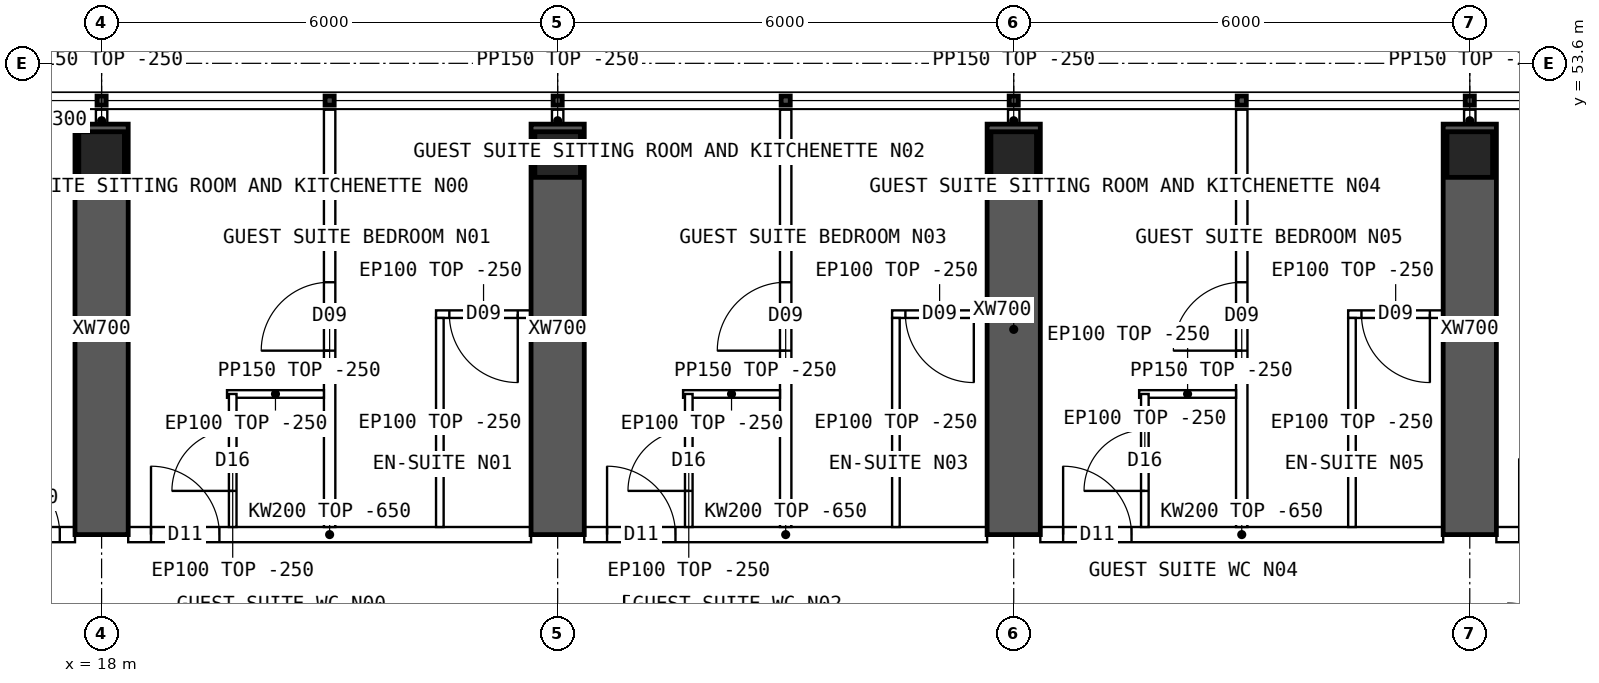
"""IFC4 building model, lengths in metres.
Left out: names, types, materials, properties, quantities, classifications, styles, units other than length and angle.
Written with IfcOpenShell. Run it as: python <this file> out.ifc"""

import sys

from ifc_helpers import new_model, si_unit, direction, frame, frame_2d, origin, origin_2d, place, context, subcontext, project, spatial, polyline, rectangle, hollow_rectangle, outline, extrude, element, fill, save


model = new_model("IFC4")
c1 = context("Model", 3, precision=1e-05, world=origin(), true_north=direction((0.0, 1.0)))
c2 = subcontext(c1, "Body", "Model", "MODEL_VIEW")
j1 = project(units=[si_unit("LENGTHUNIT", "METRE"), si_unit("PLANEANGLEUNIT", "RADIAN")], contexts=[c1])
p1 = place(None, origin())
s1 = spatial("IfcSite", under=j1, at=p1, CompositionType="ELEMENT")
p2 = place(p1, origin())
s2 = spatial("IfcBuilding", under=s1, at=p2, CompositionType="ELEMENT")
p3 = place(p2, frame((0.0, 0.0, 239.05)))
s3 = spatial("IfcBuildingStorey", under=s2, at=p3, CompositionType="ELEMENT", Elevation=239.05)
for number, where, z_axis, x_axis in (
    (1, (18.0, 52.4, 0.0), (0.0, 0.0, 1.0), (1.0, 0.0, 0.0)),
    (2, (24.0, 52.4, 0.0), (0.0, 0.0, 1.0), (1.0, 0.0, 0.0)),
    (3, (30.0, 52.4, 0.0), (0.0, 0.0, 1.0), (1.0, 0.0, 0.0)),
    (4, (36.0, 52.4, 0.0), (0.0, 0.0, 1.0), (1.0, 0.0, 0.0)),
):
    element("IfcColumn", number, at=place(p3, frame(where, z_axis=z_axis, x_axis=x_axis)), inside=s3, PredefinedType="COLUMN", context=c2, shape_type="SweptSolid", body=[
        extrude(hollow_rectangle(XDim=0.6, YDim=0.6, WallThickness=0.06, at=origin_2d()), origin(), (0.0, 0.0, 1.0), 3.75),
    ])
for number, where, z_axis, x_axis in (
    (5, (18.0, 47.4, 0.0), (0.0, 0.0, 1.0), (0.0, 1.0, 0.0)),
    (6, (24.0, 47.4, 0.0), (0.0, 0.0, 1.0), (0.0, 1.0, 0.0)),
    (7, (30.0, 47.4, 0.0), (0.0, 0.0, 1.0), (0.0, 1.0, 0.0)),
    (8, (36.0, 47.4, 0.0), (0.0, 0.0, 1.0), (0.0, 1.0, 0.0)),
):
    element("IfcWall", number, at=place(p3, frame(where, z_axis=z_axis, x_axis=x_axis)), inside=s3, PredefinedType="SHEAR", context=c2, shape_type="SweptSolid", body=[
        extrude(rectangle(XDim=5.4, YDim=0.7, at=frame_2d((2.7, 0.0))), origin(), (0.0, 0.0, 1.0), 3.75),
    ])
p4 = place(p3, frame((17.2, 52.85, 0.0), z_axis=(0.0, 0.0, 1.0), x_axis=(1.0, 0.0, 0.0)))
e9 = element("IfcWall", 9, at=p4, inside=s3, PredefinedType="SOLIDWALL", context=c2, shape_type="SweptSolid", body=[
    extrude(rectangle(XDim=0.45, YDim=0.3, at=frame_2d((0.225, 0.0))), origin(), (0.0, 0.0, 1.0), 3.5),
])
p5 = place(p3, frame((15.6, 47.4, 0.0), z_axis=(0.0, 0.0, 1.0), x_axis=(1.0, 0.0, 0.0)))
e10 = element("IfcWall", 10, at=p5, inside=s3, PredefinedType="SOLIDWALL", context=c2, shape_type="SweptSolid", body=[
    extrude(rectangle(XDim=2.05, YDim=0.2, at=frame_2d((1.025, 0.0))), origin(), (0.0, 0.0, 1.0), 3.5),
])
p6 = place(p5, frame((0.95, 0.0, 0.0)))
e11 = element("IfcOpeningElement", 11, at=p6, cuts=e10, PredefinedType="OPENING", context=c2, shape_type="SweptSolid", body=[
    extrude(rectangle(XDim=0.9, YDim=2.1, at=frame_2d((0.45, 1.05))), frame((0.0, 0.11, 0.0), z_axis=(0.0, -1.0, 0.0), x_axis=(1.0, 0.0, 0.0)), (0.0, 0.0, 1.0), 0.22),
])
p7 = place(p3, frame((18.35, 47.4, 0.0), z_axis=(0.0, 0.0, 1.0), x_axis=(1.0, 0.0, 0.0)))
e12 = element("IfcWall", 12, at=p7, inside=s3, PredefinedType="SOLIDWALL", context=c2, shape_type="SweptSolid", body=[
    extrude(outline(polyline([(0.0, 0.0), (5.3, 0.0), (5.3, 3.1), (0.0, 3.1), (0.0, 0.0)])), frame((0.0, 0.1, 0.0), z_axis=(0.0, -1.0, 0.0), x_axis=(1.0, 0.0, 0.0)), (0.0, 0.0, 1.0), 0.2),
])
p8 = place(p7, frame((0.3, 0.0, 0.0)))
e13 = element("IfcOpeningElement", 13, at=p8, cuts=e12, PredefinedType="OPENING", context=c2, shape_type="SweptSolid", body=[
    extrude(rectangle(XDim=0.9, YDim=2.1, at=frame_2d((0.45, 1.05))), frame((0.0, 0.11, 0.0), z_axis=(0.0, -1.0, 0.0), x_axis=(1.0, 0.0, 0.0)), (0.0, 0.0, 1.0), 0.22),
])
p9 = place(p3, frame((24.35, 47.4, 0.0), z_axis=(0.0, 0.0, 1.0), x_axis=(1.0, 0.0, 0.0)))
e14 = element("IfcWall", 14, at=p9, inside=s3, PredefinedType="SOLIDWALL", context=c2, shape_type="SweptSolid", body=[
    extrude(outline(polyline([(0.0, 0.0), (5.3, 0.0), (5.3, 3.1), (0.0, 3.1), (0.0, 0.0)])), frame((0.0, 0.1, 0.0), z_axis=(0.0, -1.0, 0.0), x_axis=(1.0, 0.0, 0.0)), (0.0, 0.0, 1.0), 0.2),
])
p10 = place(p9, frame((0.3, 0.0, 0.0)))
e15 = element("IfcOpeningElement", 15, at=p10, cuts=e14, PredefinedType="OPENING", context=c2, shape_type="SweptSolid", body=[
    extrude(rectangle(XDim=0.9, YDim=2.1, at=frame_2d((0.45, 1.05))), frame((0.0, 0.11, 0.0), z_axis=(0.0, -1.0, 0.0), x_axis=(1.0, 0.0, 0.0)), (0.0, 0.0, 1.0), 0.22),
])
p11 = place(p3, frame((30.35, 47.4, 0.0), z_axis=(0.0, 0.0, 1.0), x_axis=(1.0, 0.0, 0.0)))
e16 = element("IfcWall", 16, at=p11, inside=s3, PredefinedType="SOLIDWALL", context=c2, shape_type="SweptSolid", body=[
    extrude(outline(polyline([(0.0, 0.0), (5.3, 0.0), (5.3, 3.1), (0.0, 3.1), (0.0, 0.0)])), frame((0.0, 0.1, 0.0), z_axis=(0.0, -1.0, 0.0), x_axis=(1.0, 0.0, 0.0)), (0.0, 0.0, 1.0), 0.2),
])
p12 = place(p11, frame((0.3, 0.0, 0.0)))
e17 = element("IfcOpeningElement", 17, at=p12, cuts=e16, PredefinedType="OPENING", context=c2, shape_type="SweptSolid", body=[
    extrude(rectangle(XDim=0.9, YDim=2.1, at=frame_2d((0.45, 1.05))), frame((0.0, 0.11, 0.0), z_axis=(0.0, -1.0, 0.0), x_axis=(1.0, 0.0, 0.0)), (0.0, 0.0, 1.0), 0.22),
])
p13 = place(p3, frame((36.35, 47.4, 0.0), z_axis=(0.0, 0.0, 1.0), x_axis=(1.0, 0.0, 0.0)))
e18 = element("IfcWall", 18, at=p13, inside=s3, PredefinedType="SOLIDWALL", context=c2, shape_type="SweptSolid", body=[
    extrude(outline(polyline([(0.0, 0.0), (5.3, 0.0), (5.3, 3.1), (0.0, 3.1), (0.0, 0.0)])), frame((0.0, 0.1, 0.0), z_axis=(0.0, -1.0, 0.0), x_axis=(1.0, 0.0, 0.0)), (0.0, 0.0, 1.0), 0.2),
])
p14 = place(p13, frame((0.3, 0.0, 0.0)))
e19 = element("IfcOpeningElement", 19, at=p14, cuts=e18, PredefinedType="OPENING", context=c2, shape_type="SweptSolid", body=[
    extrude(rectangle(XDim=1.0, YDim=2.1, at=frame_2d((0.5, 1.05))), frame((0.0, 0.11, 0.0), z_axis=(0.0, -1.0, 0.0), x_axis=(1.0, 0.0, 0.0)), (0.0, 0.0, 1.0), 0.22),
])
p15 = place(p3, frame((21.0, 52.99, 0.0), z_axis=(0.0, 0.0, 1.0), x_axis=(0.0, -1.0, 0.0)))
e20 = element("IfcWall", 20, at=p15, inside=s3, PredefinedType="PARTITIONING", context=c2, shape_type="SweptSolid", body=[
    extrude(outline(polyline([(0.0, 0.0), (5.49, 0.0), (5.49, 3.1), (5.442, 3.1), (5.44, 3.5), (0.792, 3.5), (0.79, 3.1), (0.392, 3.1), (0.39, 3.5), (0.0, 3.5), (0.0, 0.0)])), frame((0.0, 0.075, 0.0), z_axis=(0.0, -1.0, 0.0), x_axis=(1.0, 0.0, 0.0)), (0.0, 0.0, 1.0), 0.15),
])
p16 = place(p15, frame((2.27, 0.0, 0.0)))
e21 = element("IfcOpeningElement", 21, at=p16, cuts=e20, PredefinedType="OPENING", context=c2, shape_type="SweptSolid", body=[
    extrude(rectangle(XDim=0.9, YDim=2.1, at=frame_2d((0.45, 1.05))), frame((0.0, 0.085, 0.0), z_axis=(0.0, -1.0, 0.0), x_axis=(1.0, 0.0, 0.0)), (0.0, 0.0, 1.0), 0.17),
])
p17 = place(p3, frame((22.4, 50.3, 0.0), z_axis=(0.0, 0.0, 1.0), x_axis=(1.0, 0.0, 0.0)))
e22 = element("IfcWall", 22, at=p17, inside=s3, PredefinedType="PARTITIONING", context=c2, shape_type="SweptSolid", body=[
    extrude(rectangle(XDim=1.25, YDim=0.1, at=frame_2d((0.625, 0.0))), origin(), (0.0, 0.0, 1.0), 3.5),
])
p18 = place(p17, frame((0.175, 0.0, 0.0)))
e23 = element("IfcOpeningElement", 23, at=p18, cuts=e22, PredefinedType="OPENING", context=c2, shape_type="SweptSolid", body=[
    extrude(rectangle(XDim=0.9, YDim=2.1, at=frame_2d((0.45, 1.05))), frame((0.0, 0.06, 0.0), z_axis=(0.0, -1.0, 0.0), x_axis=(1.0, 0.0, 0.0)), (0.0, 0.0, 1.0), 0.12),
])
p19 = place(p3, frame((22.45, 50.25, 0.0), z_axis=(0.0, 0.0, 1.0), x_axis=(0.0, -1.0, 0.0)))
e24 = element("IfcWall", 24, at=p19, inside=s3, PredefinedType="PARTITIONING", context=c2, shape_type="SweptSolid", body=[
    extrude(outline(polyline([(0.0, 0.0), (2.75, 0.0), (2.75, 3.1), (2.702, 3.1), (2.7, 3.5), (0.0, 3.5), (0.0, 0.0)])), frame((0.0, 0.05, 0.0), z_axis=(0.0, -1.0, 0.0), x_axis=(1.0, 0.0, 0.0)), (0.0, 0.0, 1.0), 0.1),
])
p20 = place(p3, frame((19.65, 49.25, 0.0), z_axis=(0.0, 0.0, 1.0), x_axis=(1.0, 0.0, 0.0)))
e25 = element("IfcWall", 25, at=p20, inside=s3, PredefinedType="PARTITIONING", context=c2, shape_type="SweptSolid", body=[
    extrude(rectangle(XDim=1.275, YDim=0.1, at=frame_2d((0.638, 0.0))), origin(), (0.0, 0.0, 1.0), 3.5),
])
p21 = place(p3, frame((19.725, 49.25, 0.0), z_axis=(0.0, 0.0, 1.0), x_axis=(0.0, -1.0, 0.0)))
e26 = element("IfcWall", 26, at=p21, inside=s3, PredefinedType="PARTITIONING", context=c2, shape_type="SweptSolid", body=[
    extrude(outline(polyline([(0.0, 0.0), (1.75, 0.0), (1.75, 3.1), (1.702, 3.1), (1.7, 3.5), (0.0, 3.5), (0.0, 0.0)])), frame((0.0, 0.05, 0.0), z_axis=(0.0, -1.0, 0.0), x_axis=(1.0, 0.0, 0.0)), (0.0, 0.0, 1.0), 0.1),
])
p22 = place(p21, frame((0.475, 0.0, 0.0)))
e27 = element("IfcOpeningElement", 27, at=p22, cuts=e26, PredefinedType="OPENING", context=c2, shape_type="SweptSolid", body=[
    extrude(rectangle(XDim=0.8, YDim=2.1, at=frame_2d((0.4, 1.05))), frame((0.0, 0.06, 0.0), z_axis=(0.0, -1.0, 0.0), x_axis=(1.0, 0.0, 0.0)), (0.0, 0.0, 1.0), 0.12),
])
p23 = place(p3, frame((27.0, 52.99, 0.0), z_axis=(0.0, 0.0, 1.0), x_axis=(0.0, -1.0, 0.0)))
e28 = element("IfcWall", 28, at=p23, inside=s3, PredefinedType="PARTITIONING", context=c2, shape_type="SweptSolid", body=[
    extrude(outline(polyline([(0.0, 0.0), (5.49, 0.0), (5.49, 3.1), (5.442, 3.1), (5.44, 3.5), (0.792, 3.5), (0.79, 3.1), (0.392, 3.1), (0.39, 3.5), (0.0, 3.5), (0.0, 0.0)])), frame((0.0, 0.075, 0.0), z_axis=(0.0, -1.0, 0.0), x_axis=(1.0, 0.0, 0.0)), (0.0, 0.0, 1.0), 0.15),
])
p24 = place(p23, frame((2.27, 0.0, 0.0)))
e29 = element("IfcOpeningElement", 29, at=p24, cuts=e28, PredefinedType="OPENING", context=c2, shape_type="SweptSolid", body=[
    extrude(rectangle(XDim=0.9, YDim=2.1, at=frame_2d((0.45, 1.05))), frame((0.0, 0.085, 0.0), z_axis=(0.0, -1.0, 0.0), x_axis=(1.0, 0.0, 0.0)), (0.0, 0.0, 1.0), 0.17),
])
p25 = place(p3, frame((28.4, 50.3, 0.0), z_axis=(0.0, 0.0, 1.0), x_axis=(1.0, 0.0, 0.0)))
e30 = element("IfcWall", 30, at=p25, inside=s3, PredefinedType="PARTITIONING", context=c2, shape_type="SweptSolid", body=[
    extrude(rectangle(XDim=1.25, YDim=0.1, at=frame_2d((0.625, 0.0))), origin(), (0.0, 0.0, 1.0), 3.5),
])
p26 = place(p25, frame((0.175, 0.0, 0.0)))
e31 = element("IfcOpeningElement", 31, at=p26, cuts=e30, PredefinedType="OPENING", context=c2, shape_type="SweptSolid", body=[
    extrude(rectangle(XDim=0.9, YDim=2.1, at=frame_2d((0.45, 1.05))), frame((0.0, 0.06, 0.0), z_axis=(0.0, -1.0, 0.0), x_axis=(1.0, 0.0, 0.0)), (0.0, 0.0, 1.0), 0.12),
])
p27 = place(p3, frame((28.45, 50.25, 0.0), z_axis=(0.0, 0.0, 1.0), x_axis=(0.0, -1.0, 0.0)))
e32 = element("IfcWall", 32, at=p27, inside=s3, PredefinedType="PARTITIONING", context=c2, shape_type="SweptSolid", body=[
    extrude(outline(polyline([(0.0, 0.0), (2.75, 0.0), (2.75, 3.1), (2.702, 3.1), (2.7, 3.5), (0.0, 3.5), (0.0, 0.0)])), frame((0.0, 0.05, 0.0), z_axis=(0.0, -1.0, 0.0), x_axis=(1.0, 0.0, 0.0)), (0.0, 0.0, 1.0), 0.1),
])
p28 = place(p3, frame((25.65, 49.25, 0.0), z_axis=(0.0, 0.0, 1.0), x_axis=(1.0, 0.0, 0.0)))
e33 = element("IfcWall", 33, at=p28, inside=s3, PredefinedType="PARTITIONING", context=c2, shape_type="SweptSolid", body=[
    extrude(rectangle(XDim=1.275, YDim=0.1, at=frame_2d((0.638, 0.0))), origin(), (0.0, 0.0, 1.0), 3.5),
])
p29 = place(p3, frame((25.725, 49.25, 0.0), z_axis=(0.0, 0.0, 1.0), x_axis=(0.0, -1.0, 0.0)))
e34 = element("IfcWall", 34, at=p29, inside=s3, PredefinedType="PARTITIONING", context=c2, shape_type="SweptSolid", body=[
    extrude(outline(polyline([(0.0, 0.0), (1.75, 0.0), (1.75, 3.1), (1.702, 3.1), (1.7, 3.5), (0.0, 3.5), (0.0, 0.0)])), frame((0.0, 0.05, 0.0), z_axis=(0.0, -1.0, 0.0), x_axis=(1.0, 0.0, 0.0)), (0.0, 0.0, 1.0), 0.1),
])
p30 = place(p29, frame((0.475, 0.0, 0.0)))
e35 = element("IfcOpeningElement", 35, at=p30, cuts=e34, PredefinedType="OPENING", context=c2, shape_type="SweptSolid", body=[
    extrude(rectangle(XDim=0.8, YDim=2.1, at=frame_2d((0.4, 1.05))), frame((0.0, 0.06, 0.0), z_axis=(0.0, -1.0, 0.0), x_axis=(1.0, 0.0, 0.0)), (0.0, 0.0, 1.0), 0.12),
])
p31 = place(p3, frame((33.0, 52.99, 0.0), z_axis=(0.0, 0.0, 1.0), x_axis=(0.0, -1.0, 0.0)))
e36 = element("IfcWall", 36, at=p31, inside=s3, PredefinedType="PARTITIONING", context=c2, shape_type="SweptSolid", body=[
    extrude(outline(polyline([(0.0, 0.0), (5.49, 0.0), (5.49, 3.1), (5.442, 3.1), (5.44, 3.5), (0.792, 3.5), (0.79, 3.1), (0.392, 3.1), (0.39, 3.5), (0.0, 3.5), (0.0, 0.0)])), frame((0.0, 0.075, 0.0), z_axis=(0.0, -1.0, 0.0), x_axis=(1.0, 0.0, 0.0)), (0.0, 0.0, 1.0), 0.15),
])
p32 = place(p31, frame((2.27, 0.0, 0.0)))
e37 = element("IfcOpeningElement", 37, at=p32, cuts=e36, PredefinedType="OPENING", context=c2, shape_type="SweptSolid", body=[
    extrude(rectangle(XDim=0.9, YDim=2.1, at=frame_2d((0.45, 1.05))), frame((0.0, 0.085, 0.0), z_axis=(0.0, -1.0, 0.0), x_axis=(1.0, 0.0, 0.0)), (0.0, 0.0, 1.0), 0.17),
])
p33 = place(p3, frame((34.4, 50.3, 0.0), z_axis=(0.0, 0.0, 1.0), x_axis=(1.0, 0.0, 0.0)))
e38 = element("IfcWall", 38, at=p33, inside=s3, PredefinedType="PARTITIONING", context=c2, shape_type="SweptSolid", body=[
    extrude(rectangle(XDim=1.25, YDim=0.1, at=frame_2d((0.625, 0.0))), origin(), (0.0, 0.0, 1.0), 3.5),
])
p34 = place(p33, frame((0.175, 0.0, 0.0)))
e39 = element("IfcOpeningElement", 39, at=p34, cuts=e38, PredefinedType="OPENING", context=c2, shape_type="SweptSolid", body=[
    extrude(rectangle(XDim=0.9, YDim=2.1, at=frame_2d((0.45, 1.05))), frame((0.0, 0.06, 0.0), z_axis=(0.0, -1.0, 0.0), x_axis=(1.0, 0.0, 0.0)), (0.0, 0.0, 1.0), 0.12),
])
p35 = place(p3, frame((34.45, 50.25, 0.0), z_axis=(0.0, 0.0, 1.0), x_axis=(0.0, -1.0, 0.0)))
e40 = element("IfcWall", 40, at=p35, inside=s3, PredefinedType="PARTITIONING", context=c2, shape_type="SweptSolid", body=[
    extrude(outline(polyline([(0.0, 0.0), (2.75, 0.0), (2.75, 3.1), (2.702, 3.1), (2.7, 3.5), (0.0, 3.5), (0.0, 0.0)])), frame((0.0, 0.05, 0.0), z_axis=(0.0, -1.0, 0.0), x_axis=(1.0, 0.0, 0.0)), (0.0, 0.0, 1.0), 0.1),
])
p36 = place(p3, frame((31.65, 49.25, 0.0), z_axis=(0.0, 0.0, 1.0), x_axis=(1.0, 0.0, 0.0)))
e41 = element("IfcWall", 41, at=p36, inside=s3, PredefinedType="PARTITIONING", context=c2, shape_type="SweptSolid", body=[
    extrude(rectangle(XDim=1.275, YDim=0.1, at=frame_2d((0.638, 0.0))), origin(), (0.0, 0.0, 1.0), 3.5),
])
p37 = place(p3, frame((31.725, 49.25, 0.0), z_axis=(0.0, 0.0, 1.0), x_axis=(0.0, -1.0, 0.0)))
e42 = element("IfcWall", 42, at=p37, inside=s3, PredefinedType="PARTITIONING", context=c2, shape_type="SweptSolid", body=[
    extrude(outline(polyline([(0.0, 0.0), (1.75, 0.0), (1.75, 3.1), (1.702, 3.1), (1.7, 3.5), (0.0, 3.5), (0.0, 0.0)])), frame((0.0, 0.05, 0.0), z_axis=(0.0, -1.0, 0.0), x_axis=(1.0, 0.0, 0.0)), (0.0, 0.0, 1.0), 0.1),
])
p38 = place(p37, frame((0.475, 0.0, 0.0)))
e43 = element("IfcOpeningElement", 43, at=p38, cuts=e42, PredefinedType="OPENING", context=c2, shape_type="SweptSolid", body=[
    extrude(rectangle(XDim=0.8, YDim=2.1, at=frame_2d((0.4, 1.05))), frame((0.0, 0.06, 0.0), z_axis=(0.0, -1.0, 0.0), x_axis=(1.0, 0.0, 0.0)), (0.0, 0.0, 1.0), 0.12),
])
for number, where, z_axis, x_axis in (
    (44, (18.0, 52.7, 0.0), (0.0, 0.0, 1.0), (0.0, 1.0, 0.0)),
    (45, (24.0, 52.7, 0.0), (0.0, 0.0, 1.0), (0.0, 1.0, 0.0)),
    (46, (30.0, 52.7, 0.0), (0.0, 0.0, 1.0), (0.0, 1.0, 0.0)),
    (47, (36.0, 52.7, 0.0), (0.0, 0.0, 1.0), (0.0, 1.0, 0.0)),
):
    element("IfcWall", number, at=place(p3, frame(where, z_axis=z_axis, x_axis=x_axis)), inside=s3, PredefinedType="PARTITIONING", context=c2, shape_type="SweptSolid", body=[
        extrude(rectangle(XDim=0.29, YDim=0.15, at=frame_2d((0.145, 0.0))), origin(), (0.0, 0.0, 1.0), 3.5),
    ])
p39 = place(p8, origin())
e48 = element("IfcDoor", 48, at=p39, inside=s3, OperationType="SINGLE_SWING_LEFT", PredefinedType="DOOR", context=c2, shape_type="SweptSolid", body=[
    extrude(rectangle(XDim=0.9, YDim=2.1, at=frame_2d((0.45, 1.05))), frame((0.0, 0.025, 0.0), z_axis=(0.0, -1.0, 0.0), x_axis=(1.0, 0.0, 0.0)), (0.0, 0.0, 1.0), 0.05),
])
fill(e13, e48)
p40 = place(p18, origin())
e49 = element("IfcDoor", 49, at=p40, inside=s3, OperationType="SINGLE_SWING_RIGHT", PredefinedType="DOOR", context=c2, shape_type="SweptSolid", body=[
    extrude(rectangle(XDim=0.9, YDim=2.1, at=frame_2d((0.45, 1.05))), frame((0.0, 0.025, 0.0), z_axis=(0.0, -1.0, 0.0), x_axis=(1.0, 0.0, 0.0)), (0.0, 0.0, 1.0), 0.05),
])
fill(e23, e49)
p41 = place(p16, origin())
e50 = element("IfcDoor", 50, at=p41, inside=s3, OperationType="SINGLE_SWING_RIGHT", PredefinedType="DOOR", context=c2, shape_type="SweptSolid", body=[
    extrude(rectangle(XDim=0.9, YDim=2.1, at=frame_2d((0.45, 1.05))), frame((0.0, 0.025, 0.0), z_axis=(0.0, -1.0, 0.0), x_axis=(1.0, 0.0, 0.0)), (0.0, 0.0, 1.0), 0.05),
])
fill(e21, e50)
p42 = place(p22, origin())
e51 = element("IfcDoor", 51, at=p42, inside=s3, OperationType="SINGLE_SWING_RIGHT", PredefinedType="DOOR", context=c2, shape_type="SweptSolid", body=[
    extrude(rectangle(XDim=0.8, YDim=2.1, at=frame_2d((0.4, 1.05))), frame((0.0, 0.025, 0.0), z_axis=(0.0, -1.0, 0.0), x_axis=(1.0, 0.0, 0.0)), (0.0, 0.0, 1.0), 0.05),
])
fill(e27, e51)
p43 = place(p10, origin())
e52 = element("IfcDoor", 52, at=p43, inside=s3, OperationType="SINGLE_SWING_LEFT", PredefinedType="DOOR", context=c2, shape_type="SweptSolid", body=[
    extrude(rectangle(XDim=0.9, YDim=2.1, at=frame_2d((0.45, 1.05))), frame((0.0, 0.025, 0.0), z_axis=(0.0, -1.0, 0.0), x_axis=(1.0, 0.0, 0.0)), (0.0, 0.0, 1.0), 0.05),
])
fill(e15, e52)
p44 = place(p26, origin())
e53 = element("IfcDoor", 53, at=p44, inside=s3, OperationType="SINGLE_SWING_RIGHT", PredefinedType="DOOR", context=c2, shape_type="SweptSolid", body=[
    extrude(rectangle(XDim=0.9, YDim=2.1, at=frame_2d((0.45, 1.05))), frame((0.0, 0.025, 0.0), z_axis=(0.0, -1.0, 0.0), x_axis=(1.0, 0.0, 0.0)), (0.0, 0.0, 1.0), 0.05),
])
fill(e31, e53)
p45 = place(p24, origin())
e54 = element("IfcDoor", 54, at=p45, inside=s3, OperationType="SINGLE_SWING_RIGHT", PredefinedType="DOOR", context=c2, shape_type="SweptSolid", body=[
    extrude(rectangle(XDim=0.9, YDim=2.1, at=frame_2d((0.45, 1.05))), frame((0.0, 0.025, 0.0), z_axis=(0.0, -1.0, 0.0), x_axis=(1.0, 0.0, 0.0)), (0.0, 0.0, 1.0), 0.05),
])
fill(e29, e54)
p46 = place(p30, origin())
e55 = element("IfcDoor", 55, at=p46, inside=s3, OperationType="SINGLE_SWING_RIGHT", PredefinedType="DOOR", context=c2, shape_type="SweptSolid", body=[
    extrude(rectangle(XDim=0.8, YDim=2.1, at=frame_2d((0.4, 1.05))), frame((0.0, 0.025, 0.0), z_axis=(0.0, -1.0, 0.0), x_axis=(1.0, 0.0, 0.0)), (0.0, 0.0, 1.0), 0.05),
])
fill(e35, e55)
p47 = place(p12, origin())
e56 = element("IfcDoor", 56, at=p47, inside=s3, OperationType="SINGLE_SWING_LEFT", PredefinedType="DOOR", context=c2, shape_type="SweptSolid", body=[
    extrude(rectangle(XDim=0.9, YDim=2.1, at=frame_2d((0.45, 1.05))), frame((0.0, 0.025, 0.0), z_axis=(0.0, -1.0, 0.0), x_axis=(1.0, 0.0, 0.0)), (0.0, 0.0, 1.0), 0.05),
])
fill(e17, e56)
p48 = place(p34, origin())
e57 = element("IfcDoor", 57, at=p48, inside=s3, OperationType="SINGLE_SWING_RIGHT", PredefinedType="DOOR", context=c2, shape_type="SweptSolid", body=[
    extrude(rectangle(XDim=0.9, YDim=2.1, at=frame_2d((0.45, 1.05))), frame((0.0, 0.025, 0.0), z_axis=(0.0, -1.0, 0.0), x_axis=(1.0, 0.0, 0.0)), (0.0, 0.0, 1.0), 0.05),
])
fill(e39, e57)
p49 = place(p32, origin())
e58 = element("IfcDoor", 58, at=p49, inside=s3, OperationType="SINGLE_SWING_RIGHT", PredefinedType="DOOR", context=c2, shape_type="SweptSolid", body=[
    extrude(rectangle(XDim=0.9, YDim=2.1, at=frame_2d((0.45, 1.05))), frame((0.0, 0.025, 0.0), z_axis=(0.0, -1.0, 0.0), x_axis=(1.0, 0.0, 0.0)), (0.0, 0.0, 1.0), 0.05),
])
fill(e37, e58)
p50 = place(p38, origin())
e59 = element("IfcDoor", 59, at=p50, inside=s3, OperationType="SINGLE_SWING_RIGHT", PredefinedType="DOOR", context=c2, shape_type="SweptSolid", body=[
    extrude(rectangle(XDim=0.8, YDim=2.1, at=frame_2d((0.4, 1.05))), frame((0.0, 0.025, 0.0), z_axis=(0.0, -1.0, 0.0), x_axis=(1.0, 0.0, 0.0)), (0.0, 0.0, 1.0), 0.05),
])
fill(e43, e59)
p51 = place(p6, origin())
e60 = element("IfcDoor", 60, at=p51, inside=s3, OperationType="SINGLE_SWING_LEFT", PredefinedType="DOOR", context=c2, shape_type="SweptSolid", body=[
    extrude(rectangle(XDim=0.9, YDim=2.1, at=frame_2d((0.45, 1.05))), frame((0.0, 0.025, 0.0), z_axis=(0.0, -1.0, 0.0), x_axis=(1.0, 0.0, 0.0)), (0.0, 0.0, 1.0), 0.05),
])
fill(e11, e60)
save(model, sys.argv[1])
